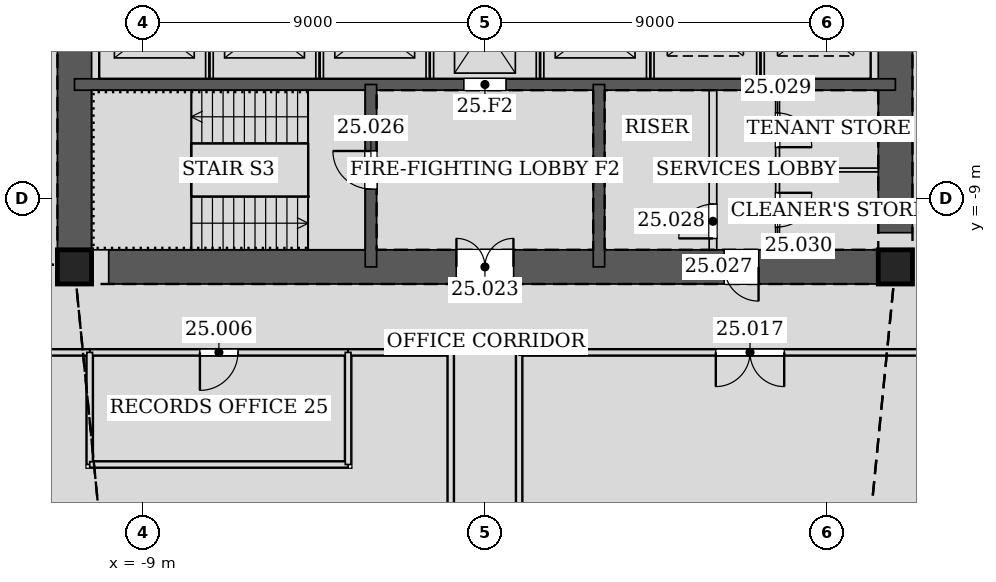
"""IFC4 building model, lengths in metres.
Left out: names, types, materials, properties, quantities, classifications, styles, units other than length and angle.
Written with IfcOpenShell. Run it as: python <this file> out.ifc"""

import sys

from ifc_helpers import new_model, si_unit, direction, frame, frame_2d, origin, origin_2d, place, context, subcontext, project, spatial, rectangle, hollow_rectangle, extrude, element, fill, save


model = new_model("IFC4")
c1 = context("Model", 3, precision=1e-05, world=origin(), true_north=direction((0.0, 1.0)))
c2 = subcontext(c1, "Body", "Model", "MODEL_VIEW")
j1 = project(units=[si_unit("LENGTHUNIT", "METRE"), si_unit("PLANEANGLEUNIT", "RADIAN")], contexts=[c1])
p1 = place(None, origin())
s1 = spatial("IfcSite", under=j1, at=p1, CompositionType="ELEMENT")
p2 = place(p1, origin())
s2 = spatial("IfcBuilding", under=s1, at=p2, CompositionType="ELEMENT")
p3 = place(p2, frame((0.0, 0.0, 113.4)))
s3 = spatial("IfcBuildingStorey", under=s2, at=p3, CompositionType="ELEMENT", Elevation=113.4)
for number, where, z_axis, x_axis in (
    (1, (-10.8, -10.8, 0.0), (0.0, 0.0, 1.0), (1.0, 0.0, 0.0)),
    (2, (10.8, -10.8, 0.0), (0.0, 0.0, 1.0), (1.0, 0.0, 0.0)),
):
    element("IfcColumn", number, at=place(p3, frame(where, z_axis=z_axis, x_axis=x_axis)), inside=s3, PredefinedType="COLUMN", context=c2, shape_type="SweptSolid", body=[
        extrude(hollow_rectangle(XDim=0.9, YDim=0.9, WallThickness=0.06, at=origin_2d()), origin(), (0.0, 0.0, 1.0), 4.2),
    ])
p4 = place(p3, frame((-10.8, -10.8, 0.0), z_axis=(0.0, 0.0, 1.0), x_axis=(1.0, 0.0, 0.0)))
e3 = element("IfcWall", 3, at=p4, inside=s3, PredefinedType="SOLIDWALL", context=c2, shape_type="SweptSolid", body=[
    extrude(rectangle(XDim=21.6, YDim=0.9, at=frame_2d((10.8, 0.0))), origin(), (0.0, 0.0, 1.0), 4.2),
])
p5 = place(p4, frame((10.05, 0.0, 0.0)))
e4 = element("IfcOpeningElement", 4, at=p5, cuts=e3, PredefinedType="OPENING", context=c2, shape_type="SweptSolid", body=[
    extrude(rectangle(XDim=1.5, YDim=2.1, at=frame_2d((0.75, 1.05))), frame((0.0, 0.46, 0.0), z_axis=(0.0, -1.0, 0.0), x_axis=(1.0, 0.0, 0.0)), (0.0, 0.0, 1.0), 0.92),
])
p6 = place(p4, frame((17.1, 0.0, 0.0)))
e5 = element("IfcOpeningElement", 5, at=p6, cuts=e3, PredefinedType="OPENING", context=c2, shape_type="SweptSolid", body=[
    extrude(rectangle(XDim=0.9, YDim=2.1, at=frame_2d((0.45, 1.05))), frame((0.0, 0.46, 0.0), z_axis=(0.0, -1.0, 0.0), x_axis=(1.0, 0.0, 0.0)), (0.0, 0.0, 1.0), 0.92),
])
p7 = place(p3, frame((10.8, -10.8, 0.0), z_axis=(0.0, 0.0, 1.0), x_axis=(0.0, 1.0, 0.0)))
e6 = element("IfcWall", 6, at=p7, inside=s3, PredefinedType="SOLIDWALL", context=c2, shape_type="SweptSolid", body=[
    extrude(rectangle(XDim=21.6, YDim=0.9, at=frame_2d((10.8, 0.0))), origin(), (0.0, 0.0, 1.0), 4.2),
])
p8 = place(p7, frame((11.7, 0.0, 0.0)))
e7 = element("IfcOpeningElement", 7, at=p8, cuts=e6, PredefinedType="OPENING", context=c2, shape_type="SweptSolid", body=[
    extrude(rectangle(XDim=1.2, YDim=2.1, at=frame_2d((0.6, 1.05))), frame((0.0, 0.46, 0.0), z_axis=(0.0, -1.0, 0.0), x_axis=(1.0, 0.0, 0.0)), (0.0, 0.0, 1.0), 0.92),
])
p9 = place(p7, frame((8.7, 0.0, 0.0)))
e8 = element("IfcOpeningElement", 8, at=p9, cuts=e6, PredefinedType="OPENING", context=c2, shape_type="SweptSolid", body=[
    extrude(rectangle(XDim=1.2, YDim=2.1, at=frame_2d((0.6, 1.05))), frame((0.0, 0.46, 0.0), z_axis=(0.0, -1.0, 0.0), x_axis=(1.0, 0.0, 0.0)), (0.0, 0.0, 1.0), 0.92),
])
p10 = place(p3, frame((-10.8, 10.8, 0.0), z_axis=(0.0, 0.0, 1.0), x_axis=(0.0, -1.0, 0.0)))
e9 = element("IfcWall", 9, at=p10, inside=s3, PredefinedType="SOLIDWALL", context=c2, shape_type="SweptSolid", body=[
    extrude(rectangle(XDim=21.6, YDim=0.9, at=frame_2d((10.8, 0.0))), origin(), (0.0, 0.0, 1.0), 4.2),
])
p11 = place(p10, frame((8.7, 0.0, 0.0)))
e10 = element("IfcOpeningElement", 10, at=p11, cuts=e9, PredefinedType="OPENING", context=c2, shape_type="SweptSolid", body=[
    extrude(rectangle(XDim=1.2, YDim=2.1, at=frame_2d((0.6, 1.05))), frame((0.0, 0.46, 0.0), z_axis=(0.0, -1.0, 0.0), x_axis=(1.0, 0.0, 0.0)), (0.0, 0.0, 1.0), 0.92),
])
p12 = place(p10, frame((11.7, 0.0, 0.0)))
e11 = element("IfcOpeningElement", 11, at=p12, cuts=e9, PredefinedType="OPENING", context=c2, shape_type="SweptSolid", body=[
    extrude(rectangle(XDim=1.2, YDim=2.1, at=frame_2d((0.6, 1.05))), frame((0.0, 0.46, 0.0), z_axis=(0.0, -1.0, 0.0), x_axis=(1.0, 0.0, 0.0)), (0.0, 0.0, 1.0), 0.92),
])
p13 = place(p3, frame((-10.8, -6.0, 0.0), z_axis=(0.0, 0.0, 1.0), x_axis=(1.0, 0.0, 0.0)))
e12 = element("IfcWall", 12, at=p13, inside=s3, PredefinedType="SOLIDWALL", context=c2, shape_type="SweptSolid", body=[
    extrude(rectangle(XDim=21.6, YDim=0.3, at=frame_2d((10.8, 0.0))), origin(), (0.0, 0.0, 1.0), 4.2),
])
p14 = place(p13, frame((10.25, 0.0, 0.0)))
e13 = element("IfcOpeningElement", 13, at=p14, cuts=e12, PredefinedType="OPENING", context=c2, shape_type="SweptSolid", body=[
    extrude(rectangle(XDim=1.1, YDim=2.1, at=frame_2d((0.55, 1.05))), frame((0.0, 0.16, 0.0), z_axis=(0.0, -1.0, 0.0), x_axis=(1.0, 0.0, 0.0)), (0.0, 0.0, 1.0), 0.32),
])
p15 = place(p3, frame((-3.0, -6.0, 0.0), z_axis=(0.0, 0.0, 1.0), x_axis=(0.0, -1.0, 0.0)))
e14 = element("IfcWall", 14, at=p15, inside=s3, PredefinedType="SOLIDWALL", context=c2, shape_type="SweptSolid", body=[
    extrude(rectangle(XDim=4.8, YDim=0.3, at=frame_2d((2.4, 0.0))), origin(), (0.0, 0.0, 1.0), 4.2),
])
p16 = place(p15, frame((1.75, 0.0, 0.0)))
e15 = element("IfcOpeningElement", 15, at=p16, cuts=e14, PredefinedType="OPENING", context=c2, shape_type="SweptSolid", body=[
    extrude(rectangle(XDim=1.0, YDim=2.1, at=frame_2d((0.5, 1.05))), frame((0.0, 0.16, 0.0), z_axis=(0.0, -1.0, 0.0), x_axis=(1.0, 0.0, 0.0)), (0.0, 0.0, 1.0), 0.32),
])
p17 = place(p3, frame((3.0, -6.0, 0.0), z_axis=(0.0, 0.0, 1.0), x_axis=(0.0, -1.0, 0.0)))
e16 = element("IfcWall", 16, at=p17, inside=s3, PredefinedType="SOLIDWALL", context=c2, shape_type="SweptSolid", body=[
    extrude(rectangle(XDim=4.8, YDim=0.3, at=frame_2d((2.4, 0.0))), origin(), (0.0, 0.0, 1.0), 4.2),
])
p18 = place(p3, frame((-10.401, -13.05, 0.0), z_axis=(0.0, 0.0, 1.0), x_axis=(1.0, 0.0, 0.0)))
e17 = element("IfcWall", 17, at=p18, inside=s3, PredefinedType="PARTITIONING", context=c2, shape_type="SweptSolid", body=[
    extrude(rectangle(XDim=6.802, YDim=0.15, at=frame_2d((3.401, 0.0))), origin(), (0.0, 0.0, 1.0), 3.098),
])
p19 = place(p18, frame((2.901, 0.0, 0.0)))
e18 = element("IfcOpeningElement", 18, at=p19, cuts=e17, PredefinedType="OPENING", context=c2, shape_type="SweptSolid", body=[
    extrude(rectangle(XDim=1.0, YDim=2.1, at=frame_2d((0.5, 1.05))), frame((0.0, 0.085, 0.0), z_axis=(0.0, -1.0, 0.0), x_axis=(1.0, 0.0, 0.0)), (0.0, 0.0, 1.0), 0.17),
])
p20 = place(p3, frame((-13.05, -13.05, 0.0), z_axis=(0.0, 0.0, 1.0), x_axis=(1.0, 0.0, 0.0)))
e19 = element("IfcWall", 19, at=p20, inside=s3, PredefinedType="PARTITIONING", context=c2, shape_type="SweptSolid", body=[
    extrude(rectangle(XDim=2.651, YDim=0.15, at=frame_2d((1.326, 0.0))), origin(), (0.0, 0.0, 1.0), 3.098),
])
p21 = place(p3, frame((-3.601, -13.05, 0.0), z_axis=(0.0, 0.0, 1.0), x_axis=(1.0, 0.0, 0.0)))
e20 = element("IfcWall", 20, at=p21, inside=s3, PredefinedType="PARTITIONING", context=c2, shape_type="SweptSolid", body=[
    extrude(rectangle(XDim=2.701, YDim=0.15, at=frame_2d((1.351, 0.0))), origin(), (0.0, 0.0, 1.0), 4.035),
])
for number, where, z_axis, x_axis in (
    (21, (-0.9, -13.05, 0.0), (0.0, 0.0, 1.0), (0.0, -1.0, 0.0)),
    (22, (0.9, -24.789, 0.0), (0.0, 0.0, 1.0), (0.0, 1.0, 0.0)),
):
    element("IfcWall", number, at=place(p3, frame(where, z_axis=z_axis, x_axis=x_axis)), inside=s3, PredefinedType="PARTITIONING", context=c2, shape_type="SweptSolid", body=[
        extrude(rectangle(XDim=11.739, YDim=0.15, at=frame_2d((5.869, 0.0))), origin(), (0.0, 0.0, 1.0), 3.426),
    ])
p22 = place(p3, frame((0.9, -13.05, 0.0), z_axis=(0.0, 0.0, 1.0), x_axis=(1.0, 0.0, 0.0)))
e23 = element("IfcWall", 23, at=p22, inside=s3, PredefinedType="PARTITIONING", context=c2, shape_type="SweptSolid", body=[
    extrude(rectangle(XDim=12.15, YDim=0.15, at=frame_2d((6.075, 0.0))), origin(), (0.0, 0.0, 1.0), 3.098),
])
p23 = place(p22, frame((5.175, 0.0, 0.0)))
e24 = element("IfcOpeningElement", 24, at=p23, cuts=e23, PredefinedType="OPENING", context=c2, shape_type="SweptSolid", body=[
    extrude(rectangle(XDim=1.8, YDim=2.4, at=frame_2d((0.9, 1.2))), frame((0.0, 0.085, 0.0), z_axis=(0.0, -1.0, 0.0), x_axis=(1.0, 0.0, 0.0)), (0.0, 0.0, 1.0), 0.17),
])
p24 = place(p3, frame((-10.4, -13.05, 0.0), z_axis=(0.0, 0.0, 1.0), x_axis=(0.0, -1.0, 0.0)))
e25 = element("IfcWall", 25, at=p24, inside=s3, PredefinedType="PARTITIONING", context=c2, shape_type="SweptSolid", body=[
    extrude(rectangle(XDim=2.95, YDim=0.15, at=frame_2d((1.475, 0.0))), origin(), (0.0, 0.0, 1.0), 3.098),
])
p25 = place(p3, frame((-10.4, -16.0, 0.0), z_axis=(0.0, 0.0, 1.0), x_axis=(1.0, 0.0, 0.0)))
e26 = element("IfcWall", 26, at=p25, inside=s3, PredefinedType="PARTITIONING", context=c2, shape_type="SweptSolid", body=[
    extrude(rectangle(XDim=6.8, YDim=0.15, at=frame_2d((3.4, 0.0))), origin(), (0.0, 0.0, 1.0), 3.098),
])
p26 = place(p3, frame((-3.6, -16.0, 0.0), z_axis=(0.0, 0.0, 1.0), x_axis=(0.0, 1.0, 0.0)))
e27 = element("IfcWall", 27, at=p26, inside=s3, PredefinedType="PARTITIONING", context=c2, shape_type="SweptSolid", body=[
    extrude(rectangle(XDim=2.95, YDim=0.15, at=frame_2d((1.475, 0.0))), origin(), (0.0, 0.0, 1.0), 3.426),
])
for number, where, z_axis, x_axis in (
    (28, (-7.25, -5.85, 0.0), (0.0, 0.0, 1.0), (0.0, 1.0, 0.0)),
    (29, (-4.35, -5.85, 0.0), (0.0, 0.0, 1.0), (0.0, 1.0, 0.0)),
    (30, (-1.45, -5.85, 0.0), (0.0, 0.0, 1.0), (0.0, 1.0, 0.0)),
    (31, (1.45, -5.85, 0.0), (0.0, 0.0, 1.0), (0.0, 1.0, 0.0)),
    (32, (4.35, -5.85, 0.0), (0.0, 0.0, 1.0), (0.0, 1.0, 0.0)),
    (33, (7.25, -5.85, 0.0), (0.0, 0.0, 1.0), (0.0, 1.0, 0.0)),
):
    element("IfcWall", number, at=place(p3, frame(where, z_axis=z_axis, x_axis=x_axis)), inside=s3, PredefinedType="PARTITIONING", context=c2, shape_type="SweptSolid", body=[
        extrude(rectangle(XDim=2.7, YDim=0.2, at=frame_2d((1.35, 0.0))), origin(), (0.0, 0.0, 1.0), 4.2),
    ])
p27 = place(p3, frame((6.0, -10.35, 0.0), z_axis=(0.0, 0.0, 1.0), x_axis=(0.0, 1.0, 0.0)))
e34 = element("IfcWall", 34, at=p27, inside=s3, PredefinedType="PARTITIONING", context=c2, shape_type="SweptSolid", body=[
    extrude(rectangle(XDim=4.2, YDim=0.2, at=frame_2d((2.1, 0.0))), origin(), (0.0, 0.0, 1.0), 4.035),
])
p28 = place(p27, frame((0.3, 0.0, 0.0)))
e35 = element("IfcOpeningElement", 35, at=p28, cuts=e34, PredefinedType="OPENING", context=c2, shape_type="SweptSolid", body=[
    extrude(rectangle(XDim=0.9, YDim=2.1, at=frame_2d((0.45, 1.05))), frame((0.0, 0.11, 0.0), z_axis=(0.0, -1.0, 0.0), x_axis=(1.0, 0.0, 0.0)), (0.0, 0.0, 1.0), 0.22),
])
p29 = place(p3, frame((7.7, -10.35, 0.0), z_axis=(0.0, 0.0, 1.0), x_axis=(0.0, 1.0, 0.0)))
e36 = element("IfcWall", 36, at=p29, inside=s3, PredefinedType="PARTITIONING", context=c2, shape_type="SweptSolid", body=[
    extrude(rectangle(XDim=4.2, YDim=0.1, at=frame_2d((2.1, 0.0))), origin(), (0.0, 0.0, 1.0), 4.035),
])
p30 = place(p29, frame((2.7, 0.0, 0.0)))
e37 = element("IfcOpeningElement", 37, at=p30, cuts=e36, PredefinedType="OPENING", context=c2, shape_type="SweptSolid", body=[
    extrude(rectangle(XDim=0.9, YDim=2.1, at=frame_2d((0.45, 1.05))), frame((0.0, 0.06, 0.0), z_axis=(0.0, -1.0, 0.0), x_axis=(1.0, 0.0, 0.0)), (0.0, 0.0, 1.0), 0.12),
])
p31 = place(p29, frame((0.6, 0.0, 0.0)))
e38 = element("IfcOpeningElement", 38, at=p31, cuts=e36, PredefinedType="OPENING", context=c2, shape_type="SweptSolid", body=[
    extrude(rectangle(XDim=0.9, YDim=2.1, at=frame_2d((0.45, 1.05))), frame((0.0, 0.06, 0.0), z_axis=(0.0, -1.0, 0.0), x_axis=(1.0, 0.0, 0.0)), (0.0, 0.0, 1.0), 0.12),
])
p32 = place(p3, frame((7.7, -8.25, 0.0), z_axis=(0.0, 0.0, 1.0), x_axis=(1.0, 0.0, 0.0)))
e39 = element("IfcWall", 39, at=p32, inside=s3, PredefinedType="PARTITIONING", context=c2, shape_type="SweptSolid", body=[
    extrude(rectangle(XDim=2.65, YDim=0.1, at=frame_2d((1.325, 0.0))), origin(), (0.0, 0.0, 1.0), 4.035),
])
p33 = place(p19, frame((1.0, 0.0, 0.0), z_axis=(0.0, 0.0, 1.0), x_axis=(-1.0, 0.0, 0.0)))
e40 = element("IfcDoor", 40, at=p33, inside=s3, OperationType="SINGLE_SWING_RIGHT", PredefinedType="DOOR", context=c2, shape_type="SweptSolid", body=[
    extrude(rectangle(XDim=1.0, YDim=2.1, at=frame_2d((0.5, 1.05))), frame((0.0, 0.025, 0.0), z_axis=(0.0, -1.0, 0.0), x_axis=(1.0, 0.0, 0.0)), (0.0, 0.0, 1.0), 0.05),
])
fill(e18, e40)
p34 = place(p23, frame((1.8, 0.0, 0.0), z_axis=(0.0, 0.0, 1.0), x_axis=(-1.0, 0.0, 0.0)))
e41 = element("IfcDoor", 41, at=p34, inside=s3, OperationType="DOUBLE_DOOR_SINGLE_SWING", PredefinedType="DOOR", context=c2, shape_type="SweptSolid", body=[
    extrude(rectangle(XDim=1.8, YDim=2.4, at=frame_2d((0.9, 1.2))), frame((0.0, 0.025, 0.0), z_axis=(0.0, -1.0, 0.0), x_axis=(1.0, 0.0, 0.0)), (0.0, 0.0, 1.0), 0.05),
])
fill(e24, e41)
p35 = place(p5, origin())
e42 = element("IfcDoor", 42, at=p35, inside=s3, OperationType="DOUBLE_DOOR_SINGLE_SWING", PredefinedType="DOOR", context=c2, shape_type="SweptSolid", body=[
    extrude(rectangle(XDim=1.5, YDim=2.1, at=frame_2d((0.75, 1.05))), frame((0.0, 0.025, 0.0), z_axis=(0.0, -1.0, 0.0), x_axis=(1.0, 0.0, 0.0)), (0.0, 0.0, 1.0), 0.05),
])
fill(e4, e42)
p36 = place(p16, frame((1.0, 0.0, 0.0), z_axis=(0.0, 0.0, 1.0), x_axis=(-1.0, 0.0, 0.0)))
e43 = element("IfcDoor", 43, at=p36, inside=s3, OperationType="SINGLE_SWING_RIGHT", PredefinedType="DOOR", context=c2, shape_type="SweptSolid", body=[
    extrude(rectangle(XDim=1.0, YDim=2.1, at=frame_2d((0.5, 1.05))), frame((0.0, 0.025, 0.0), z_axis=(0.0, -1.0, 0.0), x_axis=(1.0, 0.0, 0.0)), (0.0, 0.0, 1.0), 0.05),
])
fill(e15, e43)
p37 = place(p6, frame((0.9, 0.0, 0.0), z_axis=(0.0, 0.0, 1.0), x_axis=(-1.0, 0.0, 0.0)))
e44 = element("IfcDoor", 44, at=p37, inside=s3, OperationType="SINGLE_SWING_LEFT", PredefinedType="DOOR", context=c2, shape_type="SweptSolid", body=[
    extrude(rectangle(XDim=0.9, YDim=2.1, at=frame_2d((0.45, 1.05))), frame((0.0, 0.025, 0.0), z_axis=(0.0, -1.0, 0.0), x_axis=(1.0, 0.0, 0.0)), (0.0, 0.0, 1.0), 0.05),
])
fill(e5, e44)
p38 = place(p28, origin())
e45 = element("IfcDoor", 45, at=p38, inside=s3, OperationType="SINGLE_SWING_LEFT", PredefinedType="DOOR", context=c2, shape_type="SweptSolid", body=[
    extrude(rectangle(XDim=0.9, YDim=2.1, at=frame_2d((0.45, 1.05))), frame((0.0, 0.025, 0.0), z_axis=(0.0, -1.0, 0.0), x_axis=(1.0, 0.0, 0.0)), (0.0, 0.0, 1.0), 0.05),
])
fill(e35, e45)
p39 = place(p30, frame((0.9, 0.0, 0.0), z_axis=(0.0, 0.0, 1.0), x_axis=(-1.0, 0.0, 0.0)))
e46 = element("IfcDoor", 46, at=p39, inside=s3, OperationType="SINGLE_SWING_RIGHT", PredefinedType="DOOR", context=c2, shape_type="SweptSolid", body=[
    extrude(rectangle(XDim=0.9, YDim=2.1, at=frame_2d((0.45, 1.05))), frame((0.0, 0.025, 0.0), z_axis=(0.0, -1.0, 0.0), x_axis=(1.0, 0.0, 0.0)), (0.0, 0.0, 1.0), 0.05),
])
fill(e37, e46)
p40 = place(p31, frame((0.9, 0.0, 0.0), z_axis=(0.0, 0.0, 1.0), x_axis=(-1.0, 0.0, 0.0)))
e47 = element("IfcDoor", 47, at=p40, inside=s3, OperationType="SINGLE_SWING_LEFT", PredefinedType="DOOR", context=c2, shape_type="SweptSolid", body=[
    extrude(rectangle(XDim=0.9, YDim=2.1, at=frame_2d((0.45, 1.05))), frame((0.0, 0.025, 0.0), z_axis=(0.0, -1.0, 0.0), x_axis=(1.0, 0.0, 0.0)), (0.0, 0.0, 1.0), 0.05),
])
fill(e38, e47)
p41 = place(p14, origin())
e48 = element("IfcDoor", 48, at=p41, inside=s3, OperationType="DOUBLE_DOOR_SLIDING", PredefinedType="DOOR", context=c2, shape_type="SweptSolid", body=[
    extrude(rectangle(XDim=1.1, YDim=2.1, at=frame_2d((0.55, 1.05))), frame((0.0, 0.025, 0.0), z_axis=(0.0, -1.0, 0.0), x_axis=(1.0, 0.0, 0.0)), (0.0, 0.0, 1.0), 0.05),
])
fill(e13, e48)
save(model, sys.argv[1])
